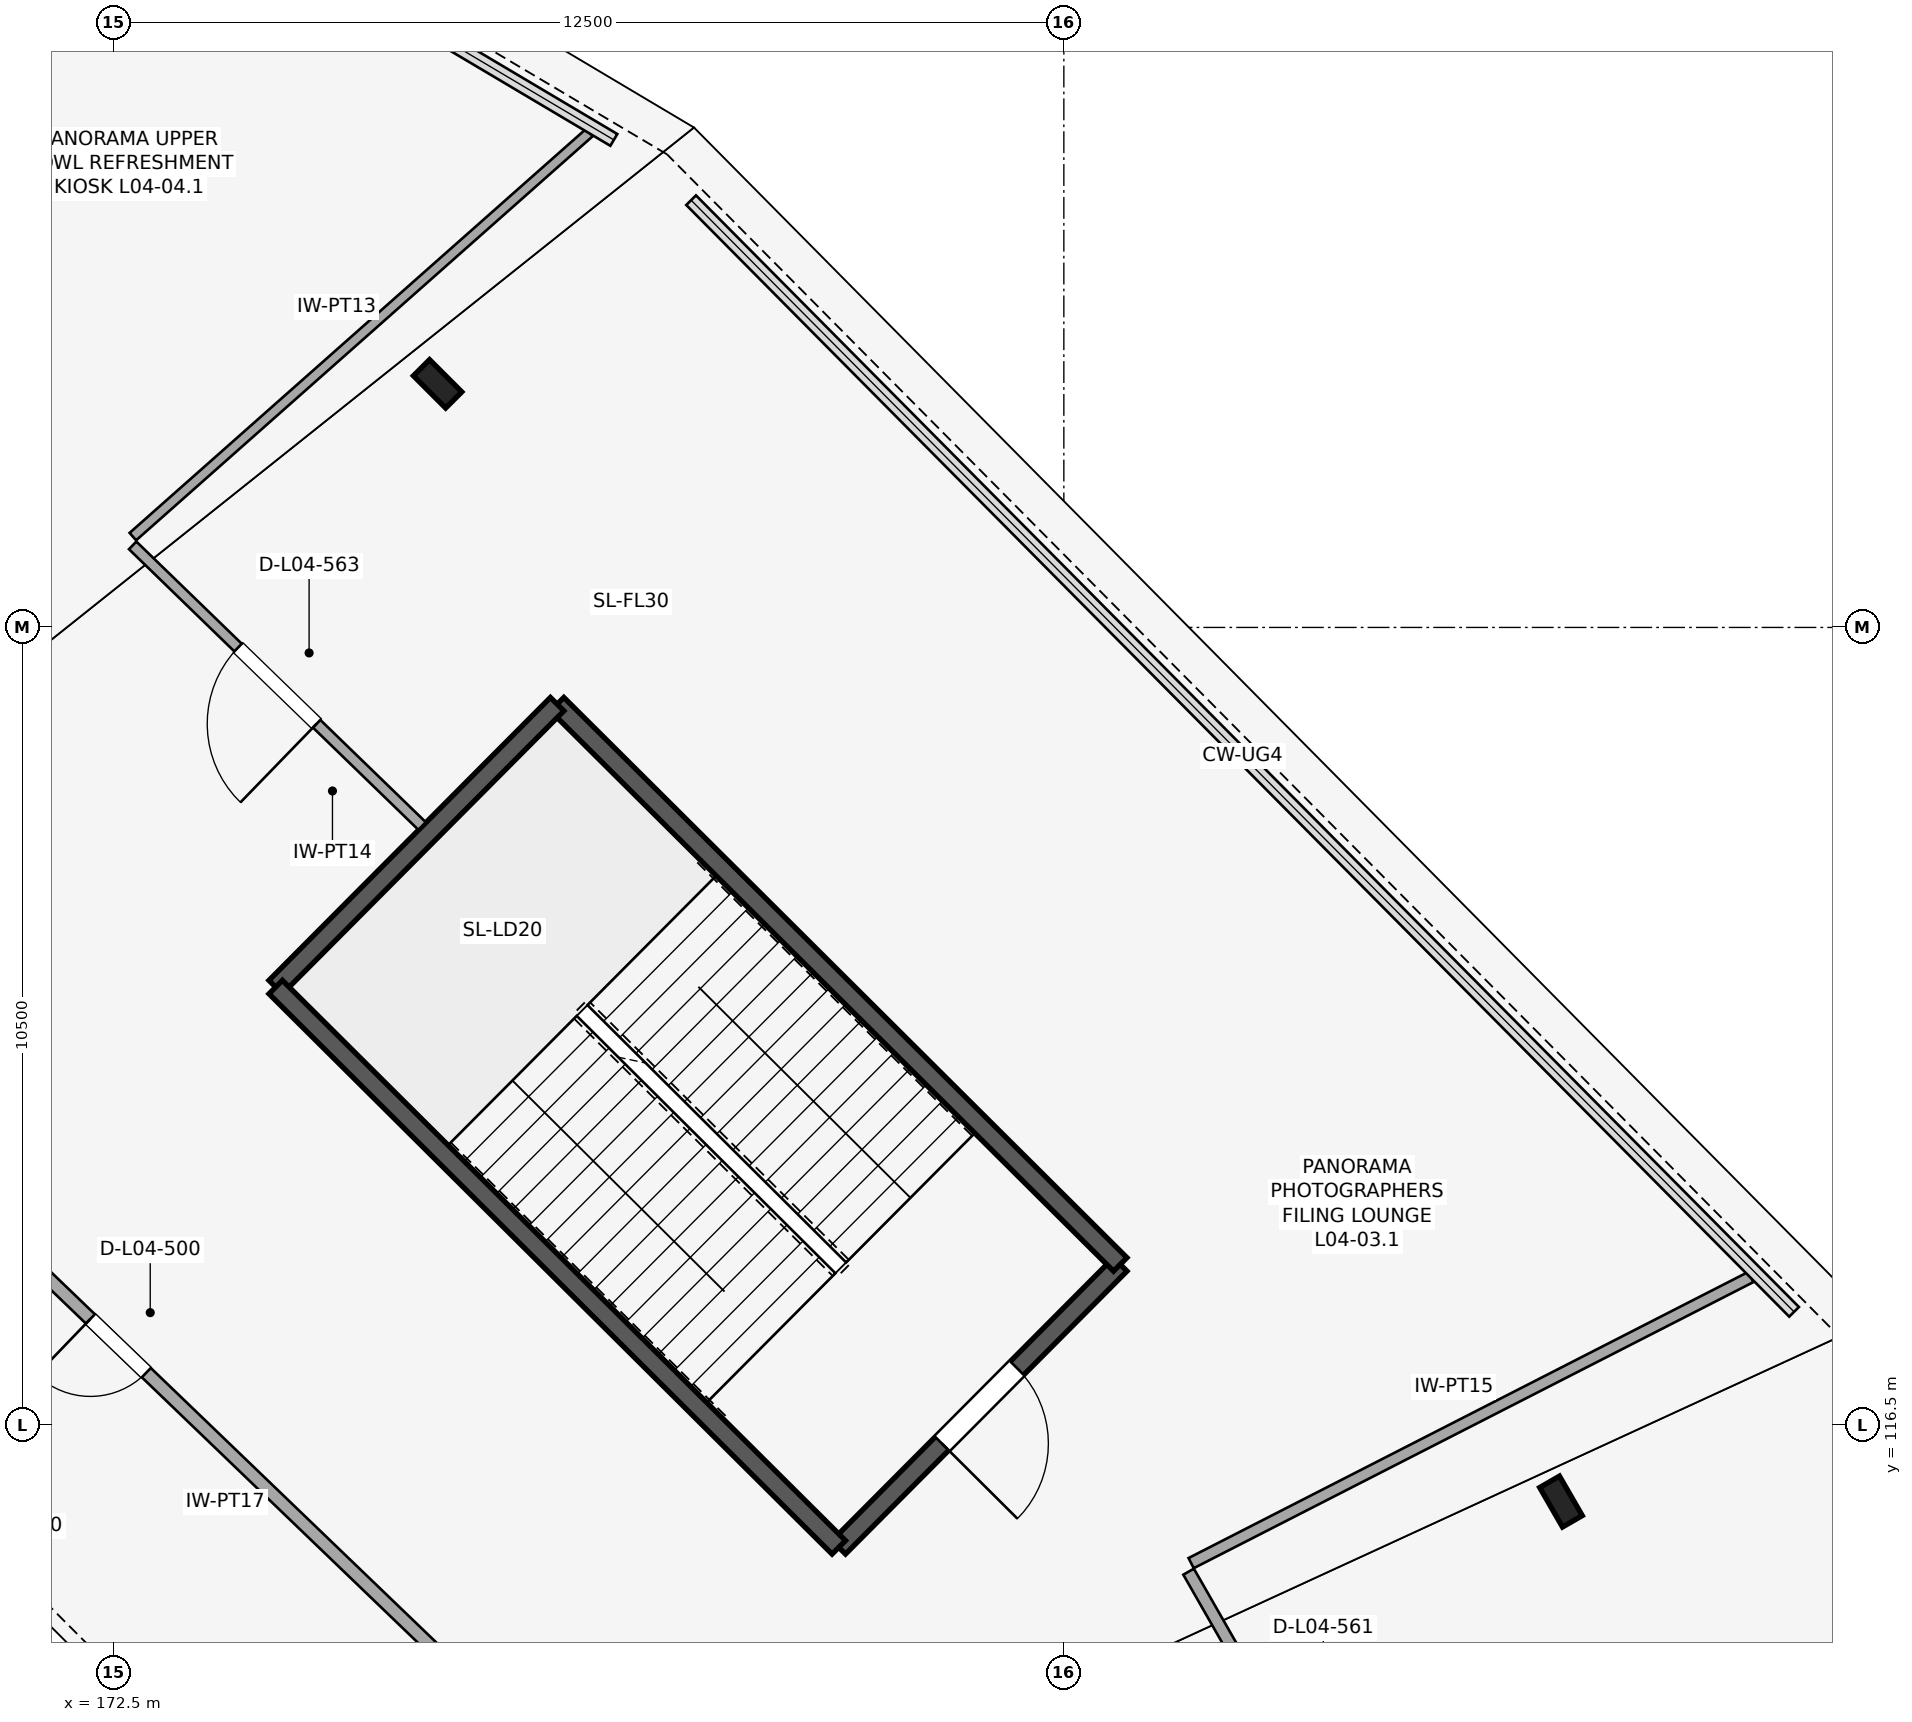
"""IFC4 building model, lengths in metres.
Left out: names, types, materials, properties, quantities, classifications, styles, units other than length and angle.
Written with IfcOpenShell. Run it as: python <this file> out.ifc"""

import sys

from ifc_helpers import new_model, si_unit, direction, frame, frame_2d, origin, origin_2d, place, context, subcontext, project, spatial, rectangle, i_section, extrude, element, fill, save


model = new_model("IFC4")
c1 = context("Model", 3, precision=1e-05, world=origin(), true_north=direction((0.0, 1.0)))
c2 = subcontext(c1, "Body", "Model", "MODEL_VIEW")
j1 = project(units=[si_unit("LENGTHUNIT", "METRE"), si_unit("PLANEANGLEUNIT", "RADIAN")], contexts=[c1])
p1 = place(None, origin())
s1 = spatial("IfcSite", under=j1, at=p1, CompositionType="ELEMENT")
p2 = place(p1, origin())
s2 = spatial("IfcBuilding", under=s1, at=p2, CompositionType="ELEMENT")
p3 = place(p2, frame((0.0, 0.0, 20.8)))
s3 = spatial("IfcBuildingStorey", under=s2, at=p3, CompositionType="ELEMENT", Elevation=20.8)
for number, where, z_axis, x_axis in (
    (1, (191.54, 115.5, 0.0), (0.0, 0.0, 1.0), (0.866, 0.5, 0.0)),
    (2, (176.761, 130.205, 0.0), (0.0, 0.0, 1.0), (0.707, 0.707, 0.0)),
):
    element("IfcColumn", number, at=place(p3, frame(where, z_axis=z_axis, x_axis=x_axis)), inside=s3, PredefinedType="COLUMN", context=c2, shape_type="SweptSolid", body=[
        extrude(i_section(OverallWidth=0.3, OverallDepth=0.6, WebThickness=0.015, FlangeThickness=0.03, FilletRadius=0.027, at=origin_2d()), origin(), (0.0, 0.0, 1.0), 5.4),
    ])
p4 = place(p3, frame((182.039, 114.898, 0.0), z_axis=(0.0, 0.0, 1.0), x_axis=(0.705314141126, 0.708894888067, 0.0)))
e3 = element("IfcWall", 3, at=p4, inside=s3, PredefinedType="SHEAR", context=c2, shape_type="SweptSolid", body=[
    extrude(rectangle(XDim=5.25, YDim=0.25, at=frame_2d((2.625, 0.0))), origin(), (0.0, 0.0, 1.0), 5.14),
])
p5 = place(p4, frame((1.925, 0.0, 0.0)))
e4 = element("IfcOpeningElement", 4, at=p5, cuts=e3, PredefinedType="OPENING", context=c2, shape_type="SweptSolid", body=[
    extrude(rectangle(XDim=1.4, YDim=2.2, at=frame_2d((0.7, 1.1))), frame((0.0, 0.135, 0.0), z_axis=(0.0, -1.0, 0.0), x_axis=(1.0, 0.0, 0.0)), (0.0, 0.0, 1.0), 0.27),
])
p6 = place(p3, frame((185.742, 118.62, 0.0), z_axis=(0.0, 0.0, 1.0), x_axis=(-0.708891762409, 0.705317282639, 0.0)))
e5 = element("IfcWall", 5, at=p6, inside=s3, PredefinedType="SHEAR", context=c2, shape_type="SweptSolid", body=[
    extrude(rectangle(XDim=10.45, YDim=0.25, at=frame_2d((5.225, 0.0))), origin(), (0.0, 0.0, 1.0), 5.14),
])
p7 = place(p3, frame((178.334, 125.99, 0.0), z_axis=(0.0, 0.0, 1.0), x_axis=(-0.705314141126, -0.708894888067, 0.0)))
e6 = element("IfcWall", 6, at=p7, inside=s3, PredefinedType="SHEAR", context=c2, shape_type="SweptSolid", body=[
    extrude(rectangle(XDim=5.25, YDim=0.25, at=frame_2d((2.625, 0.0))), origin(), (0.0, 0.0, 1.0), 5.14),
])
p8 = place(p3, frame((174.631, 122.269, 0.0), z_axis=(0.0, 0.0, 1.0), x_axis=(0.708891762409, -0.705317282639, 0.0)))
e7 = element("IfcWall", 7, at=p8, inside=s3, PredefinedType="SHEAR", context=c2, shape_type="SweptSolid", body=[
    extrude(rectangle(XDim=10.45, YDim=0.25, at=frame_2d((5.225, 0.0))), origin(), (0.0, 0.0, 1.0), 5.14),
])
p9 = place(p3, frame((178.411, 111.925, 0.0), z_axis=(0.0, 0.0, 1.0), x_axis=(-0.720913125546, 0.693025443556, 0.0)))
e8 = element("IfcWall", 8, at=p9, inside=s3, PredefinedType="PARTITIONING", context=c2, shape_type="SweptSolid", body=[
    extrude(rectangle(XDim=16.231, YDim=0.17, at=frame_2d((8.115, 0.0))), origin(), (0.0, 0.0, 1.0), 3.89),
])
p10 = place(p9, frame((7.605, 0.0, 0.0)))
e9 = element("IfcOpeningElement", 9, at=p10, cuts=e8, PredefinedType="OPENING", context=c2, shape_type="SweptSolid", body=[
    extrude(rectangle(XDim=1.02, YDim=2.38, at=frame_2d((0.51, 1.19))), frame((0.0, 0.095, 0.0), z_axis=(0.0, -1.0, 0.0), x_axis=(1.0, 0.0, 0.0)), (0.0, 0.0, 1.0), 0.19),
])
p11 = place(p3, frame((189.144, 110.201, 0.0), z_axis=(0.0, 0.0, 1.0), x_axis=(-0.496337087784, 0.868129883883, 0.0)))
e10 = element("IfcWall", 10, at=p11, inside=s3, PredefinedType="PARTITIONING", context=c2, shape_type="SweptSolid", body=[
    extrude(rectangle(XDim=5.042, YDim=0.16, at=frame_2d((2.521, 0.0))), origin(), (0.0, 0.0, 1.0), 3.89),
])
p12 = place(p11, frame((1.801, 0.0, 0.0)))
e11 = element("IfcOpeningElement", 11, at=p12, cuts=e10, PredefinedType="OPENING", context=c2, shape_type="SweptSolid", body=[
    extrude(rectangle(XDim=1.44, YDim=2.1, at=frame_2d((0.72, 1.05))), frame((0.0, 0.09, 0.0), z_axis=(0.0, -1.0, 0.0), x_axis=(1.0, 0.0, 0.0)), (0.0, 0.0, 1.0), 0.18),
])
p13 = place(p3, frame((186.675, 114.69, 0.0), z_axis=(0.0, 0.0, 1.0), x_axis=(0.890400117207, 0.455178680606, 0.0)))
e12 = element("IfcWall", 12, at=p13, inside=s3, PredefinedType="PARTITIONING", context=c2, shape_type="SweptSolid", body=[
    extrude(rectangle(XDim=8.27, YDim=0.15, at=frame_2d((4.135, 0.0))), origin(), (0.0, 0.0, 1.0), 3.89),
])
p14 = place(p3, frame((176.556, 124.388, 0.0), z_axis=(0.0, 0.0, 1.0), x_axis=(-0.717933859763, 0.696111322279, 0.0)))
e13 = element("IfcWall", 13, at=p14, inside=s3, PredefinedType="PARTITIONING", context=c2, shape_type="SweptSolid", body=[
    extrude(rectangle(XDim=5.303, YDim=0.14, at=frame_2d((2.651, 0.0))), origin(), (0.0, 0.0, 1.0), 3.89),
])
p15 = place(p14, frame((1.931, 0.0, 0.0)))
e14 = element("IfcOpeningElement", 14, at=p15, cuts=e13, PredefinedType="OPENING", context=c2, shape_type="SweptSolid", body=[
    extrude(rectangle(XDim=1.44, YDim=2.38, at=frame_2d((0.72, 1.19))), frame((0.0, 0.08, 0.0), z_axis=(0.0, -1.0, 0.0), x_axis=(1.0, 0.0, 0.0)), (0.0, 0.0, 1.0), 0.16),
])
p16 = place(p3, frame((172.752, 128.195, 0.0), z_axis=(0.0, 0.0, 1.0), x_axis=(0.748823395348, 0.662769584833, 0.0)))
e15 = element("IfcWall", 15, at=p16, inside=s3, PredefinedType="PARTITIONING", context=c2, shape_type="SweptSolid", body=[
    extrude(rectangle(XDim=8.021, YDim=0.13, at=frame_2d((4.01, 0.0))), origin(), (0.0, 0.0, 1.0), 3.89),
])
p17 = place(p5, frame((1.4, 0.0, 0.0), z_axis=(0.0, 0.0, 1.0), x_axis=(-1.0, 0.0, 0.0)))
e16 = element("IfcDoor", 16, at=p17, inside=s3, OperationType="SINGLE_SWING_RIGHT", PredefinedType="DOOR", context=c2, shape_type="SweptSolid", body=[
    extrude(rectangle(XDim=1.4, YDim=2.2, at=frame_2d((0.7, 1.1))), frame((0.0, 0.025, 0.0), z_axis=(0.0, -1.0, 0.0), x_axis=(1.0, 0.0, 0.0)), (0.0, 0.0, 1.0), 0.05),
])
fill(e4, e16)
p18 = place(p10, origin())
e17 = element("IfcDoor", 17, at=p18, inside=s3, OperationType="SINGLE_SWING_RIGHT", PredefinedType="DOOR", context=c2, shape_type="SweptSolid", body=[
    extrude(rectangle(XDim=1.02, YDim=2.38, at=frame_2d((0.51, 1.19))), frame((0.0, 0.025, 0.0), z_axis=(0.0, -1.0, 0.0), x_axis=(1.0, 0.0, 0.0)), (0.0, 0.0, 1.0), 0.05),
])
fill(e9, e17)
p19 = place(p15, origin())
e18 = element("IfcDoor", 18, at=p19, inside=s3, OperationType="SINGLE_SWING_LEFT", PredefinedType="DOOR", context=c2, shape_type="SweptSolid", body=[
    extrude(rectangle(XDim=1.44, YDim=2.38, at=frame_2d((0.72, 1.19))), frame((0.0, 0.025, 0.0), z_axis=(0.0, -1.0, 0.0), x_axis=(1.0, 0.0, 0.0)), (0.0, 0.0, 1.0), 0.05),
])
fill(e14, e18)
save(model, sys.argv[1])
